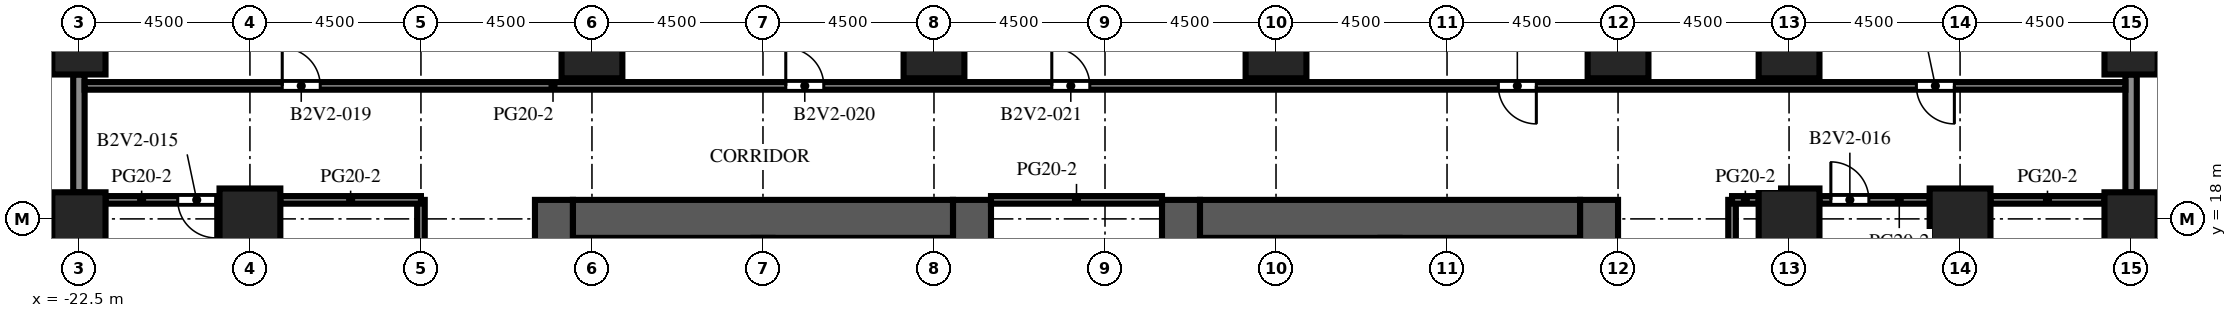
"""IFC4 building model, lengths in metres.
Left out: names, types, materials, properties, quantities, classifications, styles, units other than length and angle.
Written with IfcOpenShell. Run it as: python <this file> out.ifc"""

import sys

from ifc_helpers import new_model, si_unit, direction, frame, frame_2d, origin, origin_2d, place, context, subcontext, project, spatial, rectangle, extrude, element, fill, save


model = new_model("IFC4")
c1 = context("Model", 3, precision=1e-05, world=origin(), true_north=direction((0.0, 1.0)))
c2 = subcontext(c1, "Body", "Model", "MODEL_VIEW")
j1 = project(units=[si_unit("LENGTHUNIT", "METRE"), si_unit("PLANEANGLEUNIT", "RADIAN")], contexts=[c1])
p1 = place(None, origin())
s1 = spatial("IfcSite", under=j1, at=p1, CompositionType="ELEMENT")
p2 = place(p1, origin())
s2 = spatial("IfcBuilding", under=s1, at=p2, CompositionType="ELEMENT")
p3 = place(p2, frame((0.0, 0.0, 66.5)))
s3 = spatial("IfcBuildingStorey", under=s2, at=p3, CompositionType="ELEMENT", Elevation=66.5)
for number, where, z_axis, x_axis in (
    (1, (-22.5, 18.0, 0.0), (0.0, 0.0, 1.0), (1.0, 0.0, 0.0)),
    (2, (-22.5, 22.5, 0.0), (0.0, 0.0, 1.0), (1.0, 0.0, 0.0)),
    (3, (31.5, 18.0, 0.0), (0.0, 0.0, 1.0), (1.0, 0.0, 0.0)),
    (4, (31.5, 22.5, 0.0), (0.0, 0.0, 1.0), (1.0, 0.0, 0.0)),
):
    element("IfcColumn", number, at=place(p3, frame(where, z_axis=z_axis, x_axis=x_axis)), inside=s3, PredefinedType="COLUMN", context=c2, shape_type="SweptSolid", body=[
        extrude(rectangle(XDim=1.4, YDim=1.4, at=origin_2d()), origin(), (0.0, 0.0, 1.0), 4.1),
    ])
for number, where, z_axis, x_axis in (
    (5, (-18.0, 18.0, 0.0), (0.0, 0.0, 1.0), (1.0, 0.0, 0.0)),
    (6, (-9.0, 22.5, 0.0), (0.0, 0.0, 1.0), (1.0, 0.0, 0.0)),
    (7, (0.0, 22.5, 0.0), (0.0, 0.0, 1.0), (1.0, 0.0, 0.0)),
    (8, (9.0, 22.5, 0.0), (0.0, 0.0, 1.0), (1.0, 0.0, 0.0)),
    (9, (18.0, 22.5, 0.0), (0.0, 0.0, 1.0), (1.0, 0.0, 0.0)),
    (10, (22.5, 18.0, 0.0), (0.0, 0.0, 1.0), (1.0, 0.0, 0.0)),
    (11, (22.5, 22.5, 0.0), (0.0, 0.0, 1.0), (1.0, 0.0, 0.0)),
    (12, (27.0, 18.0, 0.0), (0.0, 0.0, 1.0), (1.0, 0.0, 0.0)),
):
    element("IfcColumn", number, at=place(p3, frame(where, z_axis=z_axis, x_axis=x_axis)), inside=s3, PredefinedType="COLUMN", context=c2, shape_type="SweptSolid", body=[
        extrude(rectangle(XDim=1.6, YDim=1.6, at=origin_2d()), origin(), (0.0, 0.0, 1.0), 4.1),
    ])
p4 = place(p3, frame((-10.0, -9.0, 0.0), z_axis=(0.0, 0.0, 1.0), x_axis=(0.0, 1.0, 0.0)))
e13 = element("IfcWall", 13, at=p4, inside=s3, PredefinedType="SHEAR", context=c2, shape_type="SweptSolid", body=[
    extrude(rectangle(XDim=27.5, YDim=1.0, at=frame_2d((13.75, 0.0))), origin(), (0.0, 0.0, 1.0), 4.1),
])
p5 = place(p4, frame((12.55, 0.0, 0.0)))
e14 = element("IfcOpeningElement", 14, at=p5, cuts=e13, PredefinedType="OPENING", context=c2, shape_type="SweptSolid", body=[
    extrude(rectangle(XDim=2.4, YDim=2.4, at=frame_2d((1.2, 1.2))), frame((0.0, 0.51, 0.0), z_axis=(0.0, -1.0, 0.0), x_axis=(1.0, 0.0, 0.0)), (0.0, 0.0, 1.0), 1.02),
])
p6 = place(p4, frame((6.825, 0.0, 0.0)))
e15 = element("IfcOpeningElement", 15, at=p6, cuts=e13, PredefinedType="OPENING", context=c2, shape_type="SweptSolid", body=[
    extrude(rectangle(XDim=1.2, YDim=2.1, at=frame_2d((0.6, 1.05))), frame((0.0, 0.51, 0.0), z_axis=(0.0, -1.0, 0.0), x_axis=(1.0, 0.0, 0.0)), (0.0, 0.0, 1.0), 1.02),
])
p7 = place(p4, frame((19.475, 0.0, 0.0)))
e16 = element("IfcOpeningElement", 16, at=p7, cuts=e13, PredefinedType="OPENING", context=c2, shape_type="SweptSolid", body=[
    extrude(rectangle(XDim=1.2, YDim=2.1, at=frame_2d((0.6, 1.05))), frame((0.0, 0.51, 0.0), z_axis=(0.0, -1.0, 0.0), x_axis=(1.0, 0.0, 0.0)), (0.0, 0.0, 1.0), 1.02),
])
p8 = place(p3, frame((1.0, -9.0, 0.0), z_axis=(0.0, 0.0, 1.0), x_axis=(0.0, 1.0, 0.0)))
e17 = element("IfcWall", 17, at=p8, inside=s3, PredefinedType="SHEAR", context=c2, shape_type="SweptSolid", body=[
    extrude(rectangle(XDim=27.5, YDim=1.0, at=frame_2d((13.75, 0.0))), origin(), (0.0, 0.0, 1.0), 4.1),
])
p9 = place(p8, frame((12.55, 0.0, 0.0)))
e18 = element("IfcOpeningElement", 18, at=p9, cuts=e17, PredefinedType="OPENING", context=c2, shape_type="SweptSolid", body=[
    extrude(rectangle(XDim=2.4, YDim=2.4, at=frame_2d((1.2, 1.2))), frame((0.0, 0.51, 0.0), z_axis=(0.0, -1.0, 0.0), x_axis=(1.0, 0.0, 0.0)), (0.0, 0.0, 1.0), 1.02),
])
p10 = place(p8, frame((5.55, 0.0, 0.0)))
e19 = element("IfcOpeningElement", 19, at=p10, cuts=e17, PredefinedType="OPENING", context=c2, shape_type="SweptSolid", body=[
    extrude(rectangle(XDim=0.905, YDim=2.1, at=frame_2d((0.453, 1.05))), frame((0.0, 0.51, 0.0), z_axis=(0.0, -1.0, 0.0), x_axis=(1.0, 0.0, 0.0)), (0.0, 0.0, 1.0), 1.02),
])
p11 = place(p8, frame((23.363, 0.0, 0.0)))
e20 = element("IfcOpeningElement", 20, at=p11, cuts=e17, PredefinedType="OPENING", context=c2, shape_type="SweptSolid", body=[
    extrude(rectangle(XDim=1.2, YDim=2.1, at=frame_2d((0.6, 1.05))), frame((0.0, 0.51, 0.0), z_axis=(0.0, -1.0, 0.0), x_axis=(1.0, 0.0, 0.0)), (0.0, 0.0, 1.0), 1.02),
])
p12 = place(p3, frame((-9.5, 18.0, 0.0), z_axis=(0.0, 0.0, 1.0), x_axis=(1.0, 0.0, 0.0)))
e21 = element("IfcWall", 21, at=p12, inside=s3, PredefinedType="SHEAR", context=c2, shape_type="SweptSolid", body=[
    extrude(rectangle(XDim=10.0, YDim=1.0, at=frame_2d((5.0, 0.0))), origin(), (0.0, 0.0, 1.0), 4.1),
])
p13 = place(p3, frame((6.5, -9.0, 0.0), z_axis=(0.0, 0.0, 1.0), x_axis=(0.0, 1.0, 0.0)))
e22 = element("IfcWall", 22, at=p13, inside=s3, PredefinedType="SHEAR", context=c2, shape_type="SweptSolid", body=[
    extrude(rectangle(XDim=27.5, YDim=1.0, at=frame_2d((13.75, 0.0))), origin(), (0.0, 0.0, 1.0), 4.1),
])
p14 = place(p13, frame((12.55, 0.0, 0.0)))
e23 = element("IfcOpeningElement", 23, at=p14, cuts=e22, PredefinedType="OPENING", context=c2, shape_type="SweptSolid", body=[
    extrude(rectangle(XDim=2.4, YDim=2.4, at=frame_2d((1.2, 1.2))), frame((0.0, 0.51, 0.0), z_axis=(0.0, -1.0, 0.0), x_axis=(1.0, 0.0, 0.0)), (0.0, 0.0, 1.0), 1.02),
])
p15 = place(p13, frame((5.55, 0.0, 0.0)))
e24 = element("IfcOpeningElement", 24, at=p15, cuts=e22, PredefinedType="OPENING", context=c2, shape_type="SweptSolid", body=[
    extrude(rectangle(XDim=0.905, YDim=2.1, at=frame_2d((0.453, 1.05))), frame((0.0, 0.51, 0.0), z_axis=(0.0, -1.0, 0.0), x_axis=(1.0, 0.0, 0.0)), (0.0, 0.0, 1.0), 1.02),
])
p16 = place(p13, frame((23.363, 0.0, 0.0)))
e25 = element("IfcOpeningElement", 25, at=p16, cuts=e22, PredefinedType="OPENING", context=c2, shape_type="SweptSolid", body=[
    extrude(rectangle(XDim=1.2, YDim=2.1, at=frame_2d((0.6, 1.05))), frame((0.0, 0.51, 0.0), z_axis=(0.0, -1.0, 0.0), x_axis=(1.0, 0.0, 0.0)), (0.0, 0.0, 1.0), 1.02),
])
p17 = place(p3, frame((17.5, -9.0, 0.0), z_axis=(0.0, 0.0, 1.0), x_axis=(0.0, 1.0, 0.0)))
e26 = element("IfcWall", 26, at=p17, inside=s3, PredefinedType="SHEAR", context=c2, shape_type="SweptSolid", body=[
    extrude(rectangle(XDim=27.5, YDim=1.0, at=frame_2d((13.75, 0.0))), origin(), (0.0, 0.0, 1.0), 4.1),
])
p18 = place(p17, frame((12.55, 0.0, 0.0)))
e27 = element("IfcOpeningElement", 27, at=p18, cuts=e26, PredefinedType="OPENING", context=c2, shape_type="SweptSolid", body=[
    extrude(rectangle(XDim=2.4, YDim=2.4, at=frame_2d((1.2, 1.2))), frame((0.0, 0.51, 0.0), z_axis=(0.0, -1.0, 0.0), x_axis=(1.0, 0.0, 0.0)), (0.0, 0.0, 1.0), 1.02),
])
p19 = place(p17, frame((6.825, 0.0, 0.0)))
e28 = element("IfcOpeningElement", 28, at=p19, cuts=e26, PredefinedType="OPENING", context=c2, shape_type="SweptSolid", body=[
    extrude(rectangle(XDim=1.2, YDim=2.1, at=frame_2d((0.6, 1.05))), frame((0.0, 0.51, 0.0), z_axis=(0.0, -1.0, 0.0), x_axis=(1.0, 0.0, 0.0)), (0.0, 0.0, 1.0), 1.02),
])
p20 = place(p17, frame((19.475, 0.0, 0.0)))
e29 = element("IfcOpeningElement", 29, at=p20, cuts=e26, PredefinedType="OPENING", context=c2, shape_type="SweptSolid", body=[
    extrude(rectangle(XDim=1.2, YDim=2.1, at=frame_2d((0.6, 1.05))), frame((0.0, 0.51, 0.0), z_axis=(0.0, -1.0, 0.0), x_axis=(1.0, 0.0, 0.0)), (0.0, 0.0, 1.0), 1.02),
])
p21 = place(p3, frame((7.0, 18.0, 0.0), z_axis=(0.0, 0.0, 1.0), x_axis=(1.0, 0.0, 0.0)))
e30 = element("IfcWall", 30, at=p21, inside=s3, PredefinedType="SHEAR", context=c2, shape_type="SweptSolid", body=[
    extrude(rectangle(XDim=10.0, YDim=1.0, at=frame_2d((5.0, 0.0))), origin(), (0.0, 0.0, 1.0), 4.1),
])
for number, where, z_axis, x_axis in (
    (31, (31.5, 21.8, 0.0), (0.0, 0.0, 1.0), (0.0, -1.0, 0.0)),
    (32, (-22.5, 18.7, 0.0), (0.0, 0.0, 1.0), (0.0, 1.0, 0.0)),
):
    element("IfcWall", number, at=place(p3, frame(where, z_axis=z_axis, x_axis=x_axis)), inside=s3, PredefinedType="SOLIDWALL", context=c2, shape_type="SweptSolid", body=[
        extrude(rectangle(XDim=3.1, YDim=0.3, at=frame_2d((1.55, 0.0))), origin(), (0.0, 0.0, 1.0), 2.6),
    ])
p22 = place(p3, frame((-13.5, -9.0, 0.0), z_axis=(0.0, 0.0, 1.0), x_axis=(0.0, 1.0, 0.0)))
e33 = element("IfcWall", 33, at=p22, inside=s3, PredefinedType="PARTITIONING", context=c2, shape_type="SweptSolid", body=[
    extrude(rectangle(XDim=27.5, YDim=0.2, at=frame_2d((13.75, 0.0))), origin(), (0.0, 0.0, 1.0), 3.5),
])
p23 = place(p22, frame((4.85, 0.0, 0.0)))
e34 = element("IfcOpeningElement", 34, at=p23, cuts=e33, PredefinedType="OPENING", context=c2, shape_type="SweptSolid", body=[
    extrude(rectangle(XDim=1.0, YDim=2.1, at=frame_2d((0.5, 1.05))), frame((0.0, 0.11, 0.0), z_axis=(0.0, -1.0, 0.0), x_axis=(1.0, 0.0, 0.0)), (0.0, 0.0, 1.0), 0.22),
])
p24 = place(p22, frame((16.35, 0.0, 0.0)))
e35 = element("IfcOpeningElement", 35, at=p24, cuts=e33, PredefinedType="OPENING", context=c2, shape_type="SweptSolid", body=[
    extrude(rectangle(XDim=1.0, YDim=2.1, at=frame_2d((0.5, 1.05))), frame((0.0, 0.11, 0.0), z_axis=(0.0, -1.0, 0.0), x_axis=(1.0, 0.0, 0.0)), (0.0, 0.0, 1.0), 0.22),
])
p25 = place(p3, frame((21.0, 18.5, 0.0), z_axis=(0.0, 0.0, 1.0), x_axis=(0.0, -1.0, 0.0)))
e36 = element("IfcWall", 36, at=p25, inside=s3, PredefinedType="PARTITIONING", context=c2, shape_type="SweptSolid", body=[
    extrude(rectangle(XDim=27.5, YDim=0.2, at=frame_2d((13.75, 0.0))), origin(), (0.0, 0.0, 1.0), 3.5),
])
p26 = place(p25, frame((19.4, 0.0, 0.0)))
e37 = element("IfcOpeningElement", 37, at=p26, cuts=e36, PredefinedType="OPENING", context=c2, shape_type="SweptSolid", body=[
    extrude(rectangle(XDim=1.0, YDim=2.1, at=frame_2d((0.5, 1.05))), frame((0.0, 0.11, 0.0), z_axis=(0.0, -1.0, 0.0), x_axis=(1.0, 0.0, 0.0)), (0.0, 0.0, 1.0), 0.22),
])
p27 = place(p25, frame((7.65, 0.0, 0.0)))
e38 = element("IfcOpeningElement", 38, at=p27, cuts=e36, PredefinedType="OPENING", context=c2, shape_type="SweptSolid", body=[
    extrude(rectangle(XDim=1.0, YDim=2.1, at=frame_2d((0.5, 1.05))), frame((0.0, 0.11, 0.0), z_axis=(0.0, -1.0, 0.0), x_axis=(1.0, 0.0, 0.0)), (0.0, 0.0, 1.0), 0.22),
])
p28 = place(p3, frame((-18.8, 18.5, 0.0), z_axis=(0.0, 0.0, 1.0), x_axis=(-1.0, 0.0, 0.0)))
e39 = element("IfcWall", 39, at=p28, inside=s3, PredefinedType="PARTITIONING", context=c2, shape_type="SweptSolid", body=[
    extrude(rectangle(XDim=3.0, YDim=0.2, at=frame_2d((1.5, 0.0))), origin(), (0.0, 0.0, 1.0), 3.5),
])
p29 = place(p28, frame((0.1, 0.0, 0.0)))
e40 = element("IfcOpeningElement", 40, at=p29, cuts=e39, PredefinedType="OPENING", context=c2, shape_type="SweptSolid", body=[
    extrude(rectangle(XDim=1.0, YDim=2.1, at=frame_2d((0.5, 1.05))), frame((0.0, 0.11, 0.0), z_axis=(0.0, -1.0, 0.0), x_axis=(1.0, 0.0, 0.0)), (0.0, 0.0, 1.0), 0.22),
])
p30 = place(p3, frame((-17.2, 18.5, 0.0), z_axis=(0.0, 0.0, 1.0), x_axis=(1.0, 0.0, 0.0)))
e41 = element("IfcWall", 41, at=p30, inside=s3, PredefinedType="PARTITIONING", context=c2, shape_type="SweptSolid", body=[
    extrude(rectangle(XDim=3.7, YDim=0.2, at=frame_2d((1.85, 0.0))), origin(), (0.0, 0.0, 1.0), 3.5),
])
p31 = place(p3, frame((1.5, 18.5, 0.0), z_axis=(0.0, 0.0, 1.0), x_axis=(1.0, 0.0, 0.0)))
e42 = element("IfcWall", 42, at=p31, inside=s3, PredefinedType="PARTITIONING", context=c2, shape_type="SweptSolid", body=[
    extrude(rectangle(XDim=4.5, YDim=0.2, at=frame_2d((2.25, 0.0))), origin(), (0.0, 0.0, 1.0), 3.5),
])
p32 = place(p3, frame((21.0, 18.5, 0.0), z_axis=(0.0, 0.0, 1.0), x_axis=(1.0, 0.0, 0.0)))
e43 = element("IfcWall", 43, at=p32, inside=s3, PredefinedType="PARTITIONING", context=c2, shape_type="SweptSolid", body=[
    extrude(rectangle(XDim=0.7, YDim=0.2, at=frame_2d((0.35, 0.0))), origin(), (0.0, 0.0, 1.0), 3.5),
])
p33 = place(p3, frame((26.2, 18.5, 0.0), z_axis=(0.0, 0.0, 1.0), x_axis=(-1.0, 0.0, 0.0)))
e44 = element("IfcWall", 44, at=p33, inside=s3, PredefinedType="PARTITIONING", context=c2, shape_type="SweptSolid", body=[
    extrude(rectangle(XDim=2.9, YDim=0.2, at=frame_2d((1.45, 0.0))), origin(), (0.0, 0.0, 1.0), 3.5),
])
p34 = place(p33, frame((1.6, 0.0, 0.0)))
e45 = element("IfcOpeningElement", 45, at=p34, cuts=e44, PredefinedType="OPENING", context=c2, shape_type="SweptSolid", body=[
    extrude(rectangle(XDim=1.0, YDim=2.1, at=frame_2d((0.5, 1.05))), frame((0.0, 0.11, 0.0), z_axis=(0.0, -1.0, 0.0), x_axis=(1.0, 0.0, 0.0)), (0.0, 0.0, 1.0), 0.22),
])
p35 = place(p3, frame((27.8, 18.5, 0.0), z_axis=(0.0, 0.0, 1.0), x_axis=(1.0, 0.0, 0.0)))
e46 = element("IfcWall", 46, at=p35, inside=s3, PredefinedType="PARTITIONING", context=c2, shape_type="SweptSolid", body=[
    extrude(rectangle(XDim=3.0, YDim=0.2, at=frame_2d((1.5, 0.0))), origin(), (0.0, 0.0, 1.0), 3.5),
])
p36 = place(p3, frame((-22.35, 21.5, 0.0), z_axis=(0.0, 0.0, 1.0), x_axis=(1.0, 0.0, 0.0)))
e47 = element("IfcWall", 47, at=p36, inside=s3, PredefinedType="PARTITIONING", context=c2, shape_type="SweptSolid", body=[
    extrude(rectangle(XDim=53.7, YDim=0.2, at=frame_2d((26.85, 0.0))), origin(), (0.0, 0.0, 1.0), 3.5),
])
p37 = place(p36, frame((5.2, 0.0, 0.0)))
e48 = element("IfcOpeningElement", 48, at=p37, cuts=e47, PredefinedType="OPENING", context=c2, shape_type="SweptSolid", body=[
    extrude(rectangle(XDim=1.0, YDim=2.1, at=frame_2d((0.5, 1.05))), frame((0.0, 0.11, 0.0), z_axis=(0.0, -1.0, 0.0), x_axis=(1.0, 0.0, 0.0)), (0.0, 0.0, 1.0), 0.22),
])
p38 = place(p36, frame((18.45, 0.0, 0.0)))
e49 = element("IfcOpeningElement", 49, at=p38, cuts=e47, PredefinedType="OPENING", context=c2, shape_type="SweptSolid", body=[
    extrude(rectangle(XDim=1.0, YDim=2.1, at=frame_2d((0.5, 1.05))), frame((0.0, 0.11, 0.0), z_axis=(0.0, -1.0, 0.0), x_axis=(1.0, 0.0, 0.0)), (0.0, 0.0, 1.0), 0.22),
])
p39 = place(p36, frame((25.45, 0.0, 0.0)))
e50 = element("IfcOpeningElement", 50, at=p39, cuts=e47, PredefinedType="OPENING", context=c2, shape_type="SweptSolid", body=[
    extrude(rectangle(XDim=1.0, YDim=2.1, at=frame_2d((0.5, 1.05))), frame((0.0, 0.11, 0.0), z_axis=(0.0, -1.0, 0.0), x_axis=(1.0, 0.0, 0.0)), (0.0, 0.0, 1.0), 0.22),
])
p40 = place(p36, frame((37.2, 0.0, 0.0)))
e51 = element("IfcOpeningElement", 51, at=p40, cuts=e47, PredefinedType="OPENING", context=c2, shape_type="SweptSolid", body=[
    extrude(rectangle(XDim=1.0, YDim=2.1, at=frame_2d((0.5, 1.05))), frame((0.0, 0.11, 0.0), z_axis=(0.0, -1.0, 0.0), x_axis=(1.0, 0.0, 0.0)), (0.0, 0.0, 1.0), 0.22),
])
p41 = place(p36, frame((48.2, 0.0, 0.0)))
e52 = element("IfcOpeningElement", 52, at=p41, cuts=e47, PredefinedType="OPENING", context=c2, shape_type="SweptSolid", body=[
    extrude(rectangle(XDim=1.0, YDim=2.1, at=frame_2d((0.5, 1.05))), frame((0.0, 0.11, 0.0), z_axis=(0.0, -1.0, 0.0), x_axis=(1.0, 0.0, 0.0)), (0.0, 0.0, 1.0), 0.22),
])
p42 = place(p29, origin())
e53 = element("IfcDoor", 53, at=p42, inside=s3, OperationType="SINGLE_SWING_LEFT", PredefinedType="DOOR", context=c2, shape_type="SweptSolid", body=[
    extrude(rectangle(XDim=1.0, YDim=2.1, at=frame_2d((0.5, 1.05))), frame((0.0, 0.025, 0.0), z_axis=(0.0, -1.0, 0.0), x_axis=(1.0, 0.0, 0.0)), (0.0, 0.0, 1.0), 0.05),
])
fill(e40, e53)
p43 = place(p34, origin())
e54 = element("IfcDoor", 54, at=p43, inside=s3, OperationType="SINGLE_SWING_RIGHT", PredefinedType="DOOR", context=c2, shape_type="SweptSolid", body=[
    extrude(rectangle(XDim=1.0, YDim=2.1, at=frame_2d((0.5, 1.05))), frame((0.0, 0.025, 0.0), z_axis=(0.0, -1.0, 0.0), x_axis=(1.0, 0.0, 0.0)), (0.0, 0.0, 1.0), 0.05),
])
fill(e45, e54)
p44 = place(p37, origin())
e55 = element("IfcDoor", 55, at=p44, inside=s3, OperationType="SINGLE_SWING_LEFT", PredefinedType="DOOR", context=c2, shape_type="SweptSolid", body=[
    extrude(rectangle(XDim=1.0, YDim=2.1, at=frame_2d((0.5, 1.05))), frame((0.0, 0.025, 0.0), z_axis=(0.0, -1.0, 0.0), x_axis=(1.0, 0.0, 0.0)), (0.0, 0.0, 1.0), 0.05),
])
fill(e48, e55)
p45 = place(p38, origin())
e56 = element("IfcDoor", 56, at=p45, inside=s3, OperationType="SINGLE_SWING_LEFT", PredefinedType="DOOR", context=c2, shape_type="SweptSolid", body=[
    extrude(rectangle(XDim=1.0, YDim=2.1, at=frame_2d((0.5, 1.05))), frame((0.0, 0.025, 0.0), z_axis=(0.0, -1.0, 0.0), x_axis=(1.0, 0.0, 0.0)), (0.0, 0.0, 1.0), 0.05),
])
fill(e49, e56)
p46 = place(p39, origin())
e57 = element("IfcDoor", 57, at=p46, inside=s3, OperationType="SINGLE_SWING_LEFT", PredefinedType="DOOR", context=c2, shape_type="SweptSolid", body=[
    extrude(rectangle(XDim=1.0, YDim=2.1, at=frame_2d((0.5, 1.05))), frame((0.0, 0.025, 0.0), z_axis=(0.0, -1.0, 0.0), x_axis=(1.0, 0.0, 0.0)), (0.0, 0.0, 1.0), 0.05),
])
fill(e50, e57)
p47 = place(p40, origin())
e58 = element("IfcDoor", 58, at=p47, inside=s3, OperationType="SINGLE_SWING_RIGHT", PredefinedType="DOOR", context=c2, shape_type="SweptSolid", body=[
    extrude(rectangle(XDim=1.0, YDim=2.1, at=frame_2d((0.5, 1.05))), frame((0.0, 0.025, 0.0), z_axis=(0.0, -1.0, 0.0), x_axis=(1.0, 0.0, 0.0)), (0.0, 0.0, 1.0), 0.05),
])
fill(e51, e58)
p48 = place(p41, origin())
e59 = element("IfcDoor", 59, at=p48, inside=s3, OperationType="SINGLE_SWING_RIGHT", PredefinedType="DOOR", context=c2, shape_type="SweptSolid", body=[
    extrude(rectangle(XDim=1.0, YDim=2.1, at=frame_2d((0.5, 1.05))), frame((0.0, 0.025, 0.0), z_axis=(0.0, -1.0, 0.0), x_axis=(1.0, 0.0, 0.0)), (0.0, 0.0, 1.0), 0.05),
])
fill(e52, e59)
save(model, sys.argv[1])
